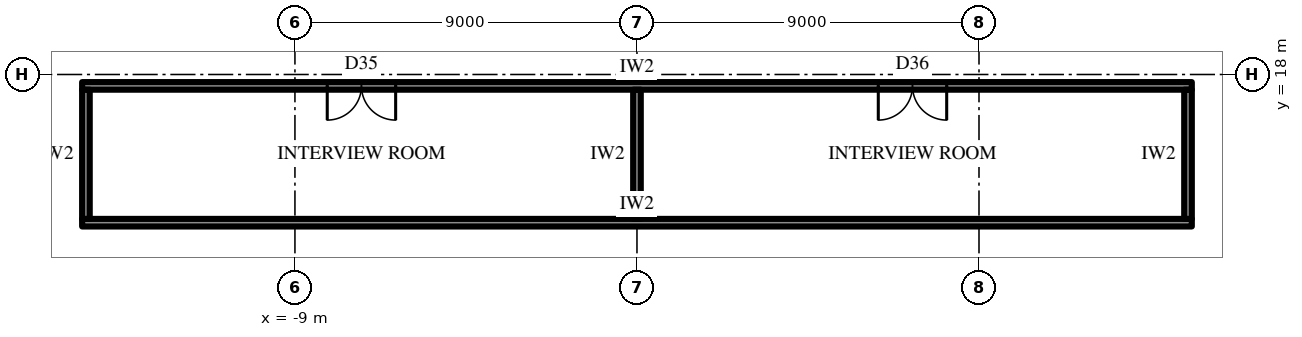
"""IFC4 building model, lengths in metres.
Left out: names, types, materials, properties, quantities, classifications, styles, units other than length and angle.
Written with IfcOpenShell. Run it as: python <this file> out.ifc"""

import sys

from ifc_helpers import new_model, si_unit, direction, frame, frame_2d, origin, place, context, subcontext, project, spatial, rectangle, extrude, element, fill, save


model = new_model("IFC4")
c1 = context("Model", 3, precision=1e-05, world=origin(), true_north=direction((0.0, 1.0)))
c2 = subcontext(c1, "Body", "Model", "MODEL_VIEW")
j1 = project(units=[si_unit("LENGTHUNIT", "METRE"), si_unit("PLANEANGLEUNIT", "RADIAN")], contexts=[c1])
p1 = place(None, origin())
s1 = spatial("IfcSite", under=j1, at=p1, CompositionType="ELEMENT")
p2 = place(p1, origin())
s2 = spatial("IfcBuilding", under=s1, at=p2, CompositionType="ELEMENT")
p3 = place(p2, frame((0.0, 0.0, 236.5)))
s3 = spatial("IfcBuildingStorey", under=s2, at=p3, CompositionType="ELEMENT", Elevation=236.5)
p4 = place(p3, frame((-14.6, 14.1, 0.0), z_axis=(0.0, 0.0, 1.0), x_axis=(1.0, 0.0, 0.0)))
e1 = element("IfcWall", 1, at=p4, inside=s3, PredefinedType="PARTITIONING", context=c2, shape_type="SweptSolid", body=[
    extrude(rectangle(XDim=29.2, YDim=0.2, at=frame_2d((14.6, 0.0))), origin(), (0.0, 0.0, 1.0), 4.0),
])
p5 = place(p3, frame((-14.6, 17.7, 0.0), z_axis=(0.0, 0.0, 1.0), x_axis=(1.0, 0.0, 0.0)))
e2 = element("IfcWall", 2, at=p5, inside=s3, PredefinedType="PARTITIONING", context=c2, shape_type="SweptSolid", body=[
    extrude(rectangle(XDim=29.2, YDim=0.2, at=frame_2d((14.6, 0.0))), origin(), (0.0, 0.0, 1.0), 4.0),
])
p6 = place(p5, frame((6.45, 0.0, 0.0)))
e3 = element("IfcOpeningElement", 3, at=p6, cuts=e2, PredefinedType="OPENING", context=c2, shape_type="SweptSolid", body=[
    extrude(rectangle(XDim=1.8, YDim=2.4, at=frame_2d((0.9, 1.2))), frame((0.0, 0.11, 0.0), z_axis=(0.0, -1.0, 0.0), x_axis=(1.0, 0.0, 0.0)), (0.0, 0.0, 1.0), 0.22),
])
p7 = place(p5, frame((20.95, 0.0, 0.0)))
e4 = element("IfcOpeningElement", 4, at=p7, cuts=e2, PredefinedType="OPENING", context=c2, shape_type="SweptSolid", body=[
    extrude(rectangle(XDim=1.8, YDim=2.4, at=frame_2d((0.9, 1.2))), frame((0.0, 0.11, 0.0), z_axis=(0.0, -1.0, 0.0), x_axis=(1.0, 0.0, 0.0)), (0.0, 0.0, 1.0), 0.22),
])
p8 = place(p3, frame((-14.5, 14.2, 0.0), z_axis=(0.0, 0.0, 1.0), x_axis=(0.0, 1.0, 0.0)))
e5 = element("IfcWall", 5, at=p8, inside=s3, PredefinedType="PARTITIONING", context=c2, shape_type="SweptSolid", body=[
    extrude(rectangle(XDim=3.4, YDim=0.2, at=frame_2d((1.7, 0.0))), origin(), (0.0, 0.0, 1.0), 4.0),
])
p9 = place(p3, frame((0.0, 14.2, 0.0), z_axis=(0.0, 0.0, 1.0), x_axis=(0.0, 1.0, 0.0)))
e6 = element("IfcWall", 6, at=p9, inside=s3, PredefinedType="PARTITIONING", context=c2, shape_type="SweptSolid", body=[
    extrude(rectangle(XDim=3.4, YDim=0.2, at=frame_2d((1.7, 0.0))), origin(), (0.0, 0.0, 1.0), 2.992),
])
p10 = place(p3, frame((14.5, 14.2, 0.0), z_axis=(0.0, 0.0, 1.0), x_axis=(0.0, 1.0, 0.0)))
e7 = element("IfcWall", 7, at=p10, inside=s3, PredefinedType="PARTITIONING", context=c2, shape_type="SweptSolid", body=[
    extrude(rectangle(XDim=3.4, YDim=0.2, at=frame_2d((1.7, 0.0))), origin(), (0.0, 0.0, 1.0), 4.0),
])
p11 = place(p6, frame((1.8, 0.0, 0.0), z_axis=(0.0, 0.0, 1.0), x_axis=(-1.0, 0.0, 0.0)))
e8 = element("IfcDoor", 8, at=p11, inside=s3, OperationType="DOUBLE_DOOR_SINGLE_SWING", PredefinedType="DOOR", context=c2, shape_type="SweptSolid", body=[
    extrude(rectangle(XDim=1.8, YDim=2.4, at=frame_2d((0.9, 1.2))), frame((0.0, 0.025, 0.0), z_axis=(0.0, -1.0, 0.0), x_axis=(1.0, 0.0, 0.0)), (0.0, 0.0, 1.0), 0.05),
])
fill(e3, e8)
p12 = place(p7, frame((1.8, 0.0, 0.0), z_axis=(0.0, 0.0, 1.0), x_axis=(-1.0, 0.0, 0.0)))
e9 = element("IfcDoor", 9, at=p12, inside=s3, OperationType="DOUBLE_DOOR_SINGLE_SWING", PredefinedType="DOOR", context=c2, shape_type="SweptSolid", body=[
    extrude(rectangle(XDim=1.8, YDim=2.4, at=frame_2d((0.9, 1.2))), frame((0.0, 0.025, 0.0), z_axis=(0.0, -1.0, 0.0), x_axis=(1.0, 0.0, 0.0)), (0.0, 0.0, 1.0), 0.05),
])
fill(e4, e9)
save(model, sys.argv[1])
